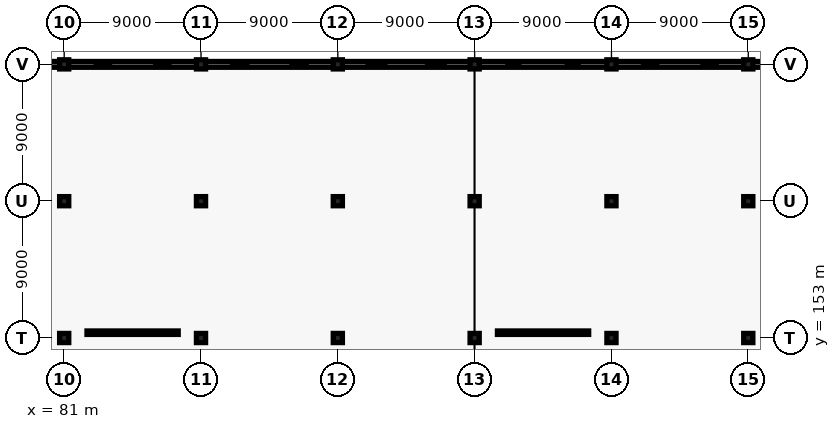
"""IFC4 building model, lengths in metres.
Left out: names, types, materials, properties, quantities, classifications, styles, units other than length and angle.
Written with IfcOpenShell. Run it as: python <this file> out.ifc"""

import sys

from ifc_helpers import new_model, si_unit, direction, frame, frame_2d, origin, origin_2d, place, context, subcontext, project, spatial, rectangle, extrude, element, fill, save


model = new_model("IFC4")
c1 = context("Model", 3, precision=1e-05, world=origin(), true_north=direction((0.0, 1.0)))
c2 = subcontext(c1, "Body", "Model", "MODEL_VIEW")
j1 = project(units=[si_unit("LENGTHUNIT", "METRE"), si_unit("PLANEANGLEUNIT", "RADIAN")], contexts=[c1])
p1 = place(None, origin())
s1 = spatial("IfcSite", under=j1, at=p1, CompositionType="ELEMENT")
p2 = place(p1, origin())
s2 = spatial("IfcBuilding", under=s1, at=p2, CompositionType="ELEMENT")
p3 = place(p2, frame((0.0, 0.0, 5.4)))
s3 = spatial("IfcBuildingStorey", under=s2, at=p3, CompositionType="ELEMENT", Elevation=5.4)
for number, where, z_axis, x_axis in (
    (1, (81.0, 153.0, 0.0), (0.0, 0.0, 1.0), (1.0, 0.0, 0.0)),
    (2, (81.0, 162.0, 0.0), (0.0, 0.0, 1.0), (1.0, 0.0, 0.0)),
    (3, (81.0, 171.0, 0.0), (0.0, 0.0, 1.0), (1.0, 0.0, 0.0)),
    (4, (90.0, 153.0, 0.0), (0.0, 0.0, 1.0), (1.0, 0.0, 0.0)),
    (5, (90.0, 162.0, 0.0), (0.0, 0.0, 1.0), (1.0, 0.0, 0.0)),
    (6, (90.0, 171.0, 0.0), (0.0, 0.0, 1.0), (1.0, 0.0, 0.0)),
    (7, (99.0, 153.0, 0.0), (0.0, 0.0, 1.0), (1.0, 0.0, 0.0)),
    (8, (99.0, 162.0, 0.0), (0.0, 0.0, 1.0), (1.0, 0.0, 0.0)),
    (9, (99.0, 171.0, 0.0), (0.0, 0.0, 1.0), (1.0, 0.0, 0.0)),
    (10, (108.0, 153.0, 0.0), (0.0, 0.0, 1.0), (1.0, 0.0, 0.0)),
    (11, (108.0, 162.0, 0.0), (0.0, 0.0, 1.0), (1.0, 0.0, 0.0)),
    (12, (108.0, 171.0, 0.0), (0.0, 0.0, 1.0), (1.0, 0.0, 0.0)),
    (13, (117.0, 153.0, 0.0), (0.0, 0.0, 1.0), (1.0, 0.0, 0.0)),
    (14, (117.0, 162.0, 0.0), (0.0, 0.0, 1.0), (1.0, 0.0, 0.0)),
    (15, (117.0, 171.0, 0.0), (0.0, 0.0, 1.0), (1.0, 0.0, 0.0)),
    (16, (126.0, 153.0, 0.0), (0.0, 0.0, 1.0), (1.0, 0.0, 0.0)),
    (17, (126.0, 162.0, 0.0), (0.0, 0.0, 1.0), (1.0, 0.0, 0.0)),
    (18, (126.0, 171.0, 0.0), (0.0, 0.0, 1.0), (1.0, 0.0, 0.0)),
):
    element("IfcColumn", number, at=place(p3, frame(where, z_axis=z_axis, x_axis=x_axis)), inside=s3, PredefinedType="COLUMN", context=c2, shape_type="SweptSolid", body=[
        extrude(rectangle(XDim=0.6, YDim=0.6, at=origin_2d()), origin(), (0.0, 0.0, 1.0), 4.2),
    ])
p4 = place(p3, frame((72.06, 171.0, 0.0), z_axis=(0.0, 0.0, 1.0), x_axis=(1.0, 0.0, 0.0)))
e19 = element("IfcWall", 19, at=p4, inside=s3, PredefinedType="SOLIDWALL", context=c2, shape_type="SweptSolid", body=[
    extrude(rectangle(XDim=8.88, YDim=0.38, at=frame_2d((4.44, 0.0))), origin(), (0.0, 0.0, 1.0), 3.4),
])
p5 = place(p4, frame((2.036, 0.0, 0.9)))
e20 = element("IfcOpeningElement", 20, at=p5, cuts=e19, PredefinedType="OPENING", context=c2, shape_type="SweptSolid", body=[
    extrude(rectangle(XDim=0.9, YDim=1.2, at=frame_2d((0.45, 0.6))), frame((0.0, 0.2, 0.0), z_axis=(0.0, -1.0, 0.0), x_axis=(1.0, 0.0, 0.0)), (0.0, 0.0, 1.0), 0.4),
])
p6 = place(p4, frame((5.944, 0.0, 0.9)))
e21 = element("IfcOpeningElement", 21, at=p6, cuts=e19, PredefinedType="OPENING", context=c2, shape_type="SweptSolid", body=[
    extrude(rectangle(XDim=0.9, YDim=1.2, at=frame_2d((0.45, 0.6))), frame((0.0, 0.2, 0.0), z_axis=(0.0, -1.0, 0.0), x_axis=(1.0, 0.0, 0.0)), (0.0, 0.0, 1.0), 0.4),
])
p7 = place(p3, frame((81.06, 171.0, 0.0), z_axis=(0.0, 0.0, 1.0), x_axis=(1.0, 0.0, 0.0)))
e22 = element("IfcWall", 22, at=p7, inside=s3, PredefinedType="SOLIDWALL", context=c2, shape_type="SweptSolid", body=[
    extrude(rectangle(XDim=8.88, YDim=0.38, at=frame_2d((4.44, 0.0))), origin(), (0.0, 0.0, 1.0), 3.4),
])
p8 = place(p7, frame((1.961, 0.0, 0.9)))
e23 = element("IfcOpeningElement", 23, at=p8, cuts=e22, PredefinedType="OPENING", context=c2, shape_type="SweptSolid", body=[
    extrude(rectangle(XDim=1.05, YDim=1.35, at=frame_2d((0.525, 0.675))), frame((0.0, 0.2, 0.0), z_axis=(0.0, -1.0, 0.0), x_axis=(1.0, 0.0, 0.0)), (0.0, 0.0, 1.0), 0.4),
])
p9 = place(p7, frame((5.869, 0.0, 0.9)))
e24 = element("IfcOpeningElement", 24, at=p9, cuts=e22, PredefinedType="OPENING", context=c2, shape_type="SweptSolid", body=[
    extrude(rectangle(XDim=1.05, YDim=1.35, at=frame_2d((0.525, 0.675))), frame((0.0, 0.2, 0.0), z_axis=(0.0, -1.0, 0.0), x_axis=(1.0, 0.0, 0.0)), (0.0, 0.0, 1.0), 0.4),
])
p10 = place(p3, frame((90.06, 171.0, 0.0), z_axis=(0.0, 0.0, 1.0), x_axis=(1.0, 0.0, 0.0)))
e25 = element("IfcWall", 25, at=p10, inside=s3, PredefinedType="SOLIDWALL", context=c2, shape_type="SweptSolid", body=[
    extrude(rectangle(XDim=8.88, YDim=0.38, at=frame_2d((4.44, 0.0))), origin(), (0.0, 0.0, 1.0), 3.4),
])
p11 = place(p10, frame((1.926, 0.0, 0.9)))
e26 = element("IfcOpeningElement", 26, at=p11, cuts=e25, PredefinedType="OPENING", context=c2, shape_type="SweptSolid", body=[
    extrude(rectangle(XDim=1.12, YDim=1.55, at=frame_2d((0.56, 0.775))), frame((0.0, 0.2, 0.0), z_axis=(0.0, -1.0, 0.0), x_axis=(1.0, 0.0, 0.0)), (0.0, 0.0, 1.0), 0.4),
])
p12 = place(p10, frame((5.834, 0.0, 0.9)))
e27 = element("IfcOpeningElement", 27, at=p12, cuts=e25, PredefinedType="OPENING", context=c2, shape_type="SweptSolid", body=[
    extrude(rectangle(XDim=1.12, YDim=1.55, at=frame_2d((0.56, 0.775))), frame((0.0, 0.2, 0.0), z_axis=(0.0, -1.0, 0.0), x_axis=(1.0, 0.0, 0.0)), (0.0, 0.0, 1.0), 0.4),
])
p13 = place(p3, frame((99.06, 171.0, 0.0), z_axis=(0.0, 0.0, 1.0), x_axis=(1.0, 0.0, 0.0)))
e28 = element("IfcWall", 28, at=p13, inside=s3, PredefinedType="SOLIDWALL", context=c2, shape_type="SweptSolid", body=[
    extrude(rectangle(XDim=8.88, YDim=0.38, at=frame_2d((4.44, 0.0))), origin(), (0.0, 0.0, 1.0), 3.4),
])
p14 = place(p13, frame((1.846, 0.0, 0.9)))
e29 = element("IfcOpeningElement", 29, at=p14, cuts=e28, PredefinedType="OPENING", context=c2, shape_type="SweptSolid", body=[
    extrude(rectangle(XDim=1.28, YDim=1.65, at=frame_2d((0.64, 0.825))), frame((0.0, 0.2, 0.0), z_axis=(0.0, -1.0, 0.0), x_axis=(1.0, 0.0, 0.0)), (0.0, 0.0, 1.0), 0.4),
])
p15 = place(p13, frame((5.754, 0.0, 0.9)))
e30 = element("IfcOpeningElement", 30, at=p15, cuts=e28, PredefinedType="OPENING", context=c2, shape_type="SweptSolid", body=[
    extrude(rectangle(XDim=1.28, YDim=1.65, at=frame_2d((0.64, 0.825))), frame((0.0, 0.2, 0.0), z_axis=(0.0, -1.0, 0.0), x_axis=(1.0, 0.0, 0.0)), (0.0, 0.0, 1.0), 0.4),
])
p16 = place(p3, frame((108.06, 171.0, 0.0), z_axis=(0.0, 0.0, 1.0), x_axis=(1.0, 0.0, 0.0)))
e31 = element("IfcWall", 31, at=p16, inside=s3, PredefinedType="SOLIDWALL", context=c2, shape_type="SweptSolid", body=[
    extrude(rectangle(XDim=8.88, YDim=0.38, at=frame_2d((4.44, 0.0))), origin(), (0.0, 0.0, 1.0), 3.4),
])
p17 = place(p16, frame((2.036, 0.0, 0.9)))
e32 = element("IfcOpeningElement", 32, at=p17, cuts=e31, PredefinedType="OPENING", context=c2, shape_type="SweptSolid", body=[
    extrude(rectangle(XDim=0.9, YDim=1.2, at=frame_2d((0.45, 0.6))), frame((0.0, 0.2, 0.0), z_axis=(0.0, -1.0, 0.0), x_axis=(1.0, 0.0, 0.0)), (0.0, 0.0, 1.0), 0.4),
])
p18 = place(p16, frame((5.944, 0.0, 0.9)))
e33 = element("IfcOpeningElement", 33, at=p18, cuts=e31, PredefinedType="OPENING", context=c2, shape_type="SweptSolid", body=[
    extrude(rectangle(XDim=0.9, YDim=1.2, at=frame_2d((0.45, 0.6))), frame((0.0, 0.2, 0.0), z_axis=(0.0, -1.0, 0.0), x_axis=(1.0, 0.0, 0.0)), (0.0, 0.0, 1.0), 0.4),
])
p19 = place(p3, frame((117.06, 171.0, 0.0), z_axis=(0.0, 0.0, 1.0), x_axis=(1.0, 0.0, 0.0)))
e34 = element("IfcWall", 34, at=p19, inside=s3, PredefinedType="SOLIDWALL", context=c2, shape_type="SweptSolid", body=[
    extrude(rectangle(XDim=8.88, YDim=0.38, at=frame_2d((4.44, 0.0))), origin(), (0.0, 0.0, 1.0), 3.4),
])
p20 = place(p19, frame((1.961, 0.0, 0.9)))
e35 = element("IfcOpeningElement", 35, at=p20, cuts=e34, PredefinedType="OPENING", context=c2, shape_type="SweptSolid", body=[
    extrude(rectangle(XDim=1.05, YDim=1.35, at=frame_2d((0.525, 0.675))), frame((0.0, 0.2, 0.0), z_axis=(0.0, -1.0, 0.0), x_axis=(1.0, 0.0, 0.0)), (0.0, 0.0, 1.0), 0.4),
])
p21 = place(p19, frame((5.869, 0.0, 0.9)))
e36 = element("IfcOpeningElement", 36, at=p21, cuts=e34, PredefinedType="OPENING", context=c2, shape_type="SweptSolid", body=[
    extrude(rectangle(XDim=1.05, YDim=1.35, at=frame_2d((0.525, 0.675))), frame((0.0, 0.2, 0.0), z_axis=(0.0, -1.0, 0.0), x_axis=(1.0, 0.0, 0.0)), (0.0, 0.0, 1.0), 0.4),
])
p22 = place(p3, frame((126.06, 171.0, 0.0), z_axis=(0.0, 0.0, 1.0), x_axis=(1.0, 0.0, 0.0)))
e37 = element("IfcWall", 37, at=p22, inside=s3, PredefinedType="SOLIDWALL", context=c2, shape_type="SweptSolid", body=[
    extrude(rectangle(XDim=8.88, YDim=0.38, at=frame_2d((4.44, 0.0))), origin(), (0.0, 0.0, 1.0), 3.4),
])
p23 = place(p22, frame((1.926, 0.0, 0.9)))
e38 = element("IfcOpeningElement", 38, at=p23, cuts=e37, PredefinedType="OPENING", context=c2, shape_type="SweptSolid", body=[
    extrude(rectangle(XDim=1.12, YDim=1.55, at=frame_2d((0.56, 0.775))), frame((0.0, 0.2, 0.0), z_axis=(0.0, -1.0, 0.0), x_axis=(1.0, 0.0, 0.0)), (0.0, 0.0, 1.0), 0.4),
])
p24 = place(p22, frame((5.834, 0.0, 0.9)))
e39 = element("IfcOpeningElement", 39, at=p24, cuts=e37, PredefinedType="OPENING", context=c2, shape_type="SweptSolid", body=[
    extrude(rectangle(XDim=1.12, YDim=1.55, at=frame_2d((0.56, 0.775))), frame((0.0, 0.2, 0.0), z_axis=(0.0, -1.0, 0.0), x_axis=(1.0, 0.0, 0.0)), (0.0, 0.0, 1.0), 0.4),
])
p25 = place(p3, frame((82.5, 153.35, 0.0), z_axis=(0.0, 0.0, 1.0), x_axis=(1.0, 0.0, 0.0)))
e40 = element("IfcWall", 40, at=p25, inside=s3, PredefinedType="PARTITIONING", context=c2, shape_type="SweptSolid", body=[
    extrude(rectangle(XDim=6.0, YDim=0.225, at=frame_2d((3.0, 0.0))), origin(), (0.0, 0.0, 1.0), 3.2),
])
p26 = place(p25, frame((2.1, 0.0, 0.0)))
e41 = element("IfcOpeningElement", 41, at=p26, cuts=e40, PredefinedType="OPENING", context=c2, shape_type="SweptSolid", body=[
    extrude(rectangle(XDim=1.8, YDim=2.4, at=frame_2d((0.9, 1.2))), frame((0.0, 0.123, 0.0), z_axis=(0.0, -1.0, 0.0), x_axis=(1.0, 0.0, 0.0)), (0.0, 0.0, 1.0), 0.245),
])
p27 = place(p3, frame((109.5, 153.35, 0.0), z_axis=(0.0, 0.0, 1.0), x_axis=(1.0, 0.0, 0.0)))
e42 = element("IfcWall", 42, at=p27, inside=s3, PredefinedType="PARTITIONING", context=c2, shape_type="SweptSolid", body=[
    extrude(rectangle(XDim=6.0, YDim=0.225, at=frame_2d((3.0, 0.0))), origin(), (0.0, 0.0, 1.0), 3.2),
])
p28 = place(p27, frame((2.025, 0.0, 0.0)))
e43 = element("IfcOpeningElement", 43, at=p28, cuts=e42, PredefinedType="OPENING", context=c2, shape_type="SweptSolid", body=[
    extrude(rectangle(XDim=1.95, YDim=2.5, at=frame_2d((0.975, 1.25))), frame((0.0, 0.123, 0.0), z_axis=(0.0, -1.0, 0.0), x_axis=(1.0, 0.0, 0.0)), (0.0, 0.0, 1.0), 0.245),
])
p29 = place(p8, origin())
e44 = element("IfcWindow", 44, at=p29, inside=s3, PartitioningType="SINGLE_PANEL", PredefinedType="WINDOW", context=c2, shape_type="SweptSolid", body=[
    extrude(rectangle(XDim=1.05, YDim=1.35, at=frame_2d((0.525, 0.675))), frame((0.0, 0.03, 0.0), z_axis=(0.0, -1.0, 0.0), x_axis=(1.0, 0.0, 0.0)), (0.0, 0.0, 1.0), 0.06),
])
fill(e23, e44)
p30 = place(p9, origin())
e45 = element("IfcWindow", 45, at=p30, inside=s3, PartitioningType="SINGLE_PANEL", PredefinedType="WINDOW", context=c2, shape_type="SweptSolid", body=[
    extrude(rectangle(XDim=1.05, YDim=1.35, at=frame_2d((0.525, 0.675))), frame((0.0, 0.03, 0.0), z_axis=(0.0, -1.0, 0.0), x_axis=(1.0, 0.0, 0.0)), (0.0, 0.0, 1.0), 0.06),
])
fill(e24, e45)
p31 = place(p11, origin())
e46 = element("IfcWindow", 46, at=p31, inside=s3, PartitioningType="SINGLE_PANEL", PredefinedType="WINDOW", context=c2, shape_type="SweptSolid", body=[
    extrude(rectangle(XDim=1.12, YDim=1.55, at=frame_2d((0.56, 0.775))), frame((0.0, 0.03, 0.0), z_axis=(0.0, -1.0, 0.0), x_axis=(1.0, 0.0, 0.0)), (0.0, 0.0, 1.0), 0.06),
])
fill(e26, e46)
p32 = place(p12, origin())
e47 = element("IfcWindow", 47, at=p32, inside=s3, PartitioningType="SINGLE_PANEL", PredefinedType="WINDOW", context=c2, shape_type="SweptSolid", body=[
    extrude(rectangle(XDim=1.12, YDim=1.55, at=frame_2d((0.56, 0.775))), frame((0.0, 0.03, 0.0), z_axis=(0.0, -1.0, 0.0), x_axis=(1.0, 0.0, 0.0)), (0.0, 0.0, 1.0), 0.06),
])
fill(e27, e47)
p33 = place(p14, origin())
e48 = element("IfcWindow", 48, at=p33, inside=s3, PartitioningType="SINGLE_PANEL", PredefinedType="WINDOW", context=c2, shape_type="SweptSolid", body=[
    extrude(rectangle(XDim=1.28, YDim=1.65, at=frame_2d((0.64, 0.825))), frame((0.0, 0.03, 0.0), z_axis=(0.0, -1.0, 0.0), x_axis=(1.0, 0.0, 0.0)), (0.0, 0.0, 1.0), 0.06),
])
fill(e29, e48)
p34 = place(p15, origin())
e49 = element("IfcWindow", 49, at=p34, inside=s3, PartitioningType="SINGLE_PANEL", PredefinedType="WINDOW", context=c2, shape_type="SweptSolid", body=[
    extrude(rectangle(XDim=1.28, YDim=1.65, at=frame_2d((0.64, 0.825))), frame((0.0, 0.03, 0.0), z_axis=(0.0, -1.0, 0.0), x_axis=(1.0, 0.0, 0.0)), (0.0, 0.0, 1.0), 0.06),
])
fill(e30, e49)
p35 = place(p17, origin())
e50 = element("IfcWindow", 50, at=p35, inside=s3, PartitioningType="SINGLE_PANEL", PredefinedType="WINDOW", context=c2, shape_type="SweptSolid", body=[
    extrude(rectangle(XDim=0.9, YDim=1.2, at=frame_2d((0.45, 0.6))), frame((0.0, 0.03, 0.0), z_axis=(0.0, -1.0, 0.0), x_axis=(1.0, 0.0, 0.0)), (0.0, 0.0, 1.0), 0.06),
])
fill(e32, e50)
p36 = place(p18, origin())
e51 = element("IfcWindow", 51, at=p36, inside=s3, PartitioningType="SINGLE_PANEL", PredefinedType="WINDOW", context=c2, shape_type="SweptSolid", body=[
    extrude(rectangle(XDim=0.9, YDim=1.2, at=frame_2d((0.45, 0.6))), frame((0.0, 0.03, 0.0), z_axis=(0.0, -1.0, 0.0), x_axis=(1.0, 0.0, 0.0)), (0.0, 0.0, 1.0), 0.06),
])
fill(e33, e51)
p37 = place(p20, origin())
e52 = element("IfcWindow", 52, at=p37, inside=s3, PartitioningType="SINGLE_PANEL", PredefinedType="WINDOW", context=c2, shape_type="SweptSolid", body=[
    extrude(rectangle(XDim=1.05, YDim=1.35, at=frame_2d((0.525, 0.675))), frame((0.0, 0.03, 0.0), z_axis=(0.0, -1.0, 0.0), x_axis=(1.0, 0.0, 0.0)), (0.0, 0.0, 1.0), 0.06),
])
fill(e35, e52)
p38 = place(p21, origin())
e53 = element("IfcWindow", 53, at=p38, inside=s3, PartitioningType="SINGLE_PANEL", PredefinedType="WINDOW", context=c2, shape_type="SweptSolid", body=[
    extrude(rectangle(XDim=1.05, YDim=1.35, at=frame_2d((0.525, 0.675))), frame((0.0, 0.03, 0.0), z_axis=(0.0, -1.0, 0.0), x_axis=(1.0, 0.0, 0.0)), (0.0, 0.0, 1.0), 0.06),
])
fill(e36, e53)
p39 = place(p26, origin())
e54 = element("IfcDoor", 54, at=p39, inside=s3, OperationType="SLIDING_TO_RIGHT", PredefinedType="DOOR", context=c2, shape_type="SweptSolid", body=[
    extrude(rectangle(XDim=1.8, YDim=2.4, at=frame_2d((0.9, 1.2))), frame((0.0, 0.025, 0.0), z_axis=(0.0, -1.0, 0.0), x_axis=(1.0, 0.0, 0.0)), (0.0, 0.0, 1.0), 0.05),
])
fill(e41, e54)
p40 = place(p28, origin())
e55 = element("IfcDoor", 55, at=p40, inside=s3, OperationType="SLIDING_TO_LEFT", PredefinedType="DOOR", context=c2, shape_type="SweptSolid", body=[
    extrude(rectangle(XDim=1.95, YDim=2.5, at=frame_2d((0.975, 1.25))), frame((0.0, 0.025, 0.0), z_axis=(0.0, -1.0, 0.0), x_axis=(1.0, 0.0, 0.0)), (0.0, 0.0, 1.0), 0.05),
])
fill(e43, e55)
save(model, sys.argv[1])
